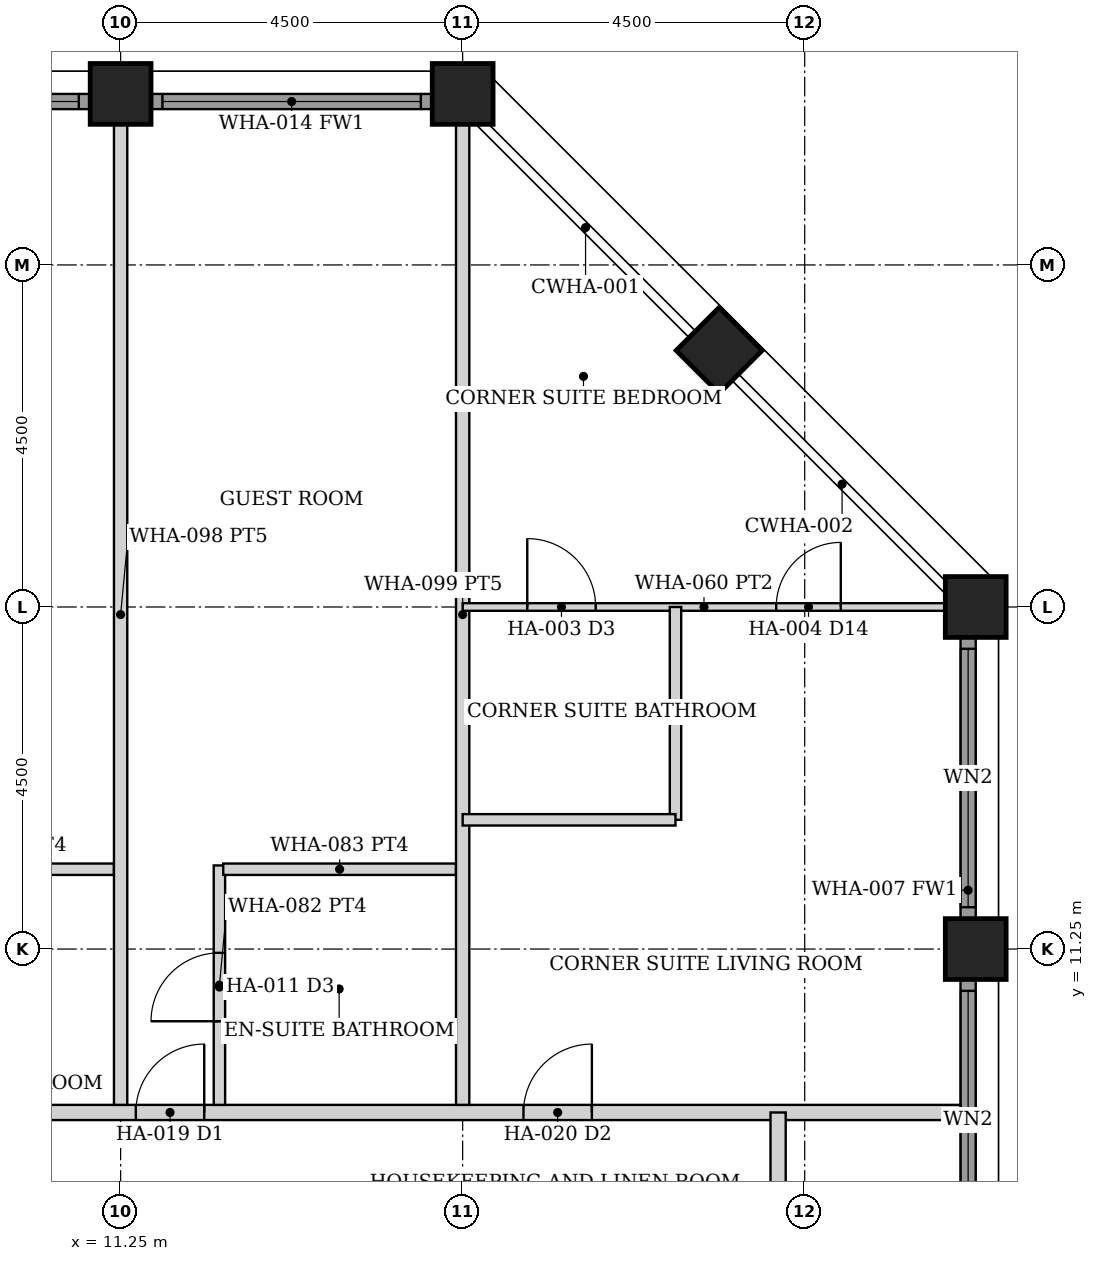
"""IFC4 building model, lengths in metres.
Left out: names, types, materials, properties, quantities, classifications, styles, units other than length and angle.
Written with IfcOpenShell. Run it as: python <this file> out.ifc"""

import sys

from ifc_helpers import new_model, si_unit, direction, frame, frame_2d, origin, origin_2d, place, context, subcontext, project, spatial, rectangle, hollow_rectangle, extrude, element, fill, save


model = new_model("IFC4")
c1 = context("Model", 3, precision=1e-05, world=origin(), true_north=direction((0.0, 1.0)))
c2 = subcontext(c1, "Body", "Model", "MODEL_VIEW")
j1 = project(units=[si_unit("LENGTHUNIT", "METRE"), si_unit("PLANEANGLEUNIT", "RADIAN")], contexts=[c1])
p1 = place(None, origin())
s1 = spatial("IfcSite", under=j1, at=p1, CompositionType="ELEMENT")
p2 = place(p1, origin())
s2 = spatial("IfcBuilding", under=s1, at=p2, CompositionType="ELEMENT")
p3 = place(p2, frame((0.0, 0.0, 118.4)))
s3 = spatial("IfcBuildingStorey", under=s2, at=p3, CompositionType="ELEMENT", Elevation=118.4)
for number, where, z_axis, x_axis in (
    (1, (11.25, 22.5, 0.0), (0.0, 0.0, 1.0), (0.0, 1.0, 0.0)),
    (2, (22.5, 11.25, 0.0), (0.0, 0.0, 1.0), (1.0, 0.0, 0.0)),
    (3, (15.75, 22.5, 0.0), (0.0, 0.0, 1.0), (0.0, 1.0, 0.0)),
    (4, (22.5, 15.75, 0.0), (0.0, 0.0, 1.0), (1.0, 0.0, 0.0)),
    (5, (19.125, 19.125, 0.0), (0.0, 0.0, 1.0), (0.707, 0.707, 0.0)),
):
    element("IfcColumn", number, at=place(p3, frame(where, z_axis=z_axis, x_axis=x_axis)), inside=s3, PredefinedType="COLUMN", context=c2, shape_type="SweptSolid", body=[
        extrude(hollow_rectangle(XDim=0.8, YDim=0.8, WallThickness=0.06, at=origin_2d()), origin(), (0.0, 0.0, 1.0), 3.6),
    ])
p4 = place(p3, frame((22.4, 7.155, 0.0), z_axis=(0.0, 0.0, 1.0), x_axis=(0.0, 1.0, 0.0)))
e6 = element("IfcWall", 6, at=p4, inside=s3, PredefinedType="SOLIDWALL", context=c2, shape_type="SweptSolid", body=[
    extrude(rectangle(XDim=3.69, YDim=0.2, at=frame_2d((1.845, 0.0))), origin(), (0.0, 0.0, 1.0), 2.479),
])
p5 = place(p4, frame((0.145, 0.0, 0.3)))
e7 = element("IfcOpeningElement", 7, at=p5, cuts=e6, PredefinedType="OPENING", context=c2, shape_type="SweptSolid", body=[
    extrude(rectangle(XDim=3.4, YDim=2.029, at=frame_2d((1.7, 1.015))), frame((0.0, 0.11, 0.0), z_axis=(0.0, -1.0, 0.0), x_axis=(1.0, 0.0, 0.0)), (0.0, 0.0, 1.0), 0.22),
])
p6 = place(p3, frame((22.4, 11.655, 0.0), z_axis=(0.0, 0.0, 1.0), x_axis=(0.0, 1.0, 0.0)))
e8 = element("IfcWall", 8, at=p6, inside=s3, PredefinedType="SOLIDWALL", context=c2, shape_type="SweptSolid", body=[
    extrude(rectangle(XDim=3.69, YDim=0.2, at=frame_2d((1.845, 0.0))), origin(), (0.0, 0.0, 1.0), 2.479),
])
p7 = place(p6, frame((0.145, 0.0, 0.3)))
e9 = element("IfcOpeningElement", 9, at=p7, cuts=e8, PredefinedType="OPENING", context=c2, shape_type="SweptSolid", body=[
    extrude(rectangle(XDim=3.4, YDim=2.029, at=frame_2d((1.7, 1.015))), frame((0.0, 0.11, 0.0), z_axis=(0.0, -1.0, 0.0), x_axis=(1.0, 0.0, 0.0)), (0.0, 0.0, 1.0), 0.22),
])
p8 = place(p3, frame((7.155, 22.4, 0.0), z_axis=(0.0, 0.0, 1.0), x_axis=(1.0, 0.0, 0.0)))
e10 = element("IfcWall", 10, at=p8, inside=s3, PredefinedType="SOLIDWALL", context=c2, shape_type="SweptSolid", body=[
    extrude(rectangle(XDim=3.69, YDim=0.2, at=frame_2d((1.845, 0.0))), origin(), (0.0, 0.0, 1.0), 2.479),
])
p9 = place(p8, frame((0.145, 0.0, 0.3)))
e11 = element("IfcOpeningElement", 11, at=p9, cuts=e10, PredefinedType="OPENING", context=c2, shape_type="SweptSolid", body=[
    extrude(rectangle(XDim=3.4, YDim=2.029, at=frame_2d((1.7, 1.015))), frame((0.0, 0.11, 0.0), z_axis=(0.0, -1.0, 0.0), x_axis=(1.0, 0.0, 0.0)), (0.0, 0.0, 1.0), 0.22),
])
p10 = place(p3, frame((11.655, 22.4, 0.0), z_axis=(0.0, 0.0, 1.0), x_axis=(1.0, 0.0, 0.0)))
e12 = element("IfcWall", 12, at=p10, inside=s3, PredefinedType="SOLIDWALL", context=c2, shape_type="SweptSolid", body=[
    extrude(rectangle(XDim=3.69, YDim=0.2, at=frame_2d((1.845, 0.0))), origin(), (0.0, 0.0, 1.0), 2.479),
])
p11 = place(p10, frame((0.145, 0.0, 0.3)))
e13 = element("IfcOpeningElement", 13, at=p11, cuts=e12, PredefinedType="OPENING", context=c2, shape_type="SweptSolid", body=[
    extrude(rectangle(XDim=3.4, YDim=2.029, at=frame_2d((1.7, 1.015))), frame((0.0, 0.11, 0.0), z_axis=(0.0, -1.0, 0.0), x_axis=(1.0, 0.0, 0.0)), (0.0, 0.0, 1.0), 0.22),
])
p12 = place(p3, frame((-22.3, 9.1, 0.0), z_axis=(0.0, 0.0, 1.0), x_axis=(1.0, 0.0, 0.0)))
e14 = element("IfcWall", 14, at=p12, inside=s3, PredefinedType="PARTITIONING", context=c2, shape_type="SweptSolid", body=[
    extrude(rectangle(XDim=44.6, YDim=0.2, at=frame_2d((22.3, 0.0))), origin(), (0.0, 0.0, 1.0), 2.473),
])
p13 = place(p12, frame((6.75, 0.0, 0.0)))
e15 = element("IfcOpeningElement", 15, at=p13, cuts=e14, PredefinedType="OPENING", context=c2, shape_type="SweptSolid", body=[
    extrude(rectangle(XDim=0.9, YDim=2.1, at=frame_2d((0.45, 1.05))), frame((0.0, 0.11, 0.0), z_axis=(0.0, -1.0, 0.0), x_axis=(1.0, 0.0, 0.0)), (0.0, 0.0, 1.0), 0.22),
])
p14 = place(p12, frame((11.25, 0.0, 0.0)))
e16 = element("IfcOpeningElement", 16, at=p14, cuts=e14, PredefinedType="OPENING", context=c2, shape_type="SweptSolid", body=[
    extrude(rectangle(XDim=0.9, YDim=2.1, at=frame_2d((0.45, 1.05))), frame((0.0, 0.11, 0.0), z_axis=(0.0, -1.0, 0.0), x_axis=(1.0, 0.0, 0.0)), (0.0, 0.0, 1.0), 0.22),
])
p15 = place(p12, frame((15.75, 0.0, 0.0)))
e17 = element("IfcOpeningElement", 17, at=p15, cuts=e14, PredefinedType="OPENING", context=c2, shape_type="SweptSolid", body=[
    extrude(rectangle(XDim=0.9, YDim=2.1, at=frame_2d((0.45, 1.05))), frame((0.0, 0.11, 0.0), z_axis=(0.0, -1.0, 0.0), x_axis=(1.0, 0.0, 0.0)), (0.0, 0.0, 1.0), 0.22),
])
p16 = place(p12, frame((20.25, 0.0, 0.0)))
e18 = element("IfcOpeningElement", 18, at=p16, cuts=e14, PredefinedType="OPENING", context=c2, shape_type="SweptSolid", body=[
    extrude(rectangle(XDim=0.9, YDim=2.1, at=frame_2d((0.45, 1.05))), frame((0.0, 0.11, 0.0), z_axis=(0.0, -1.0, 0.0), x_axis=(1.0, 0.0, 0.0)), (0.0, 0.0, 1.0), 0.22),
])
p17 = place(p12, frame((24.75, 0.0, 0.0)))
e19 = element("IfcOpeningElement", 19, at=p17, cuts=e14, PredefinedType="OPENING", context=c2, shape_type="SweptSolid", body=[
    extrude(rectangle(XDim=0.9, YDim=2.1, at=frame_2d((0.45, 1.05))), frame((0.0, 0.11, 0.0), z_axis=(0.0, -1.0, 0.0), x_axis=(1.0, 0.0, 0.0)), (0.0, 0.0, 1.0), 0.22),
])
p18 = place(p12, frame((29.25, 0.0, 0.0)))
e20 = element("IfcOpeningElement", 20, at=p18, cuts=e14, PredefinedType="OPENING", context=c2, shape_type="SweptSolid", body=[
    extrude(rectangle(XDim=0.9, YDim=2.1, at=frame_2d((0.45, 1.05))), frame((0.0, 0.11, 0.0), z_axis=(0.0, -1.0, 0.0), x_axis=(1.0, 0.0, 0.0)), (0.0, 0.0, 1.0), 0.22),
])
p19 = place(p12, frame((33.75, 0.0, 0.0)))
e21 = element("IfcOpeningElement", 21, at=p19, cuts=e14, PredefinedType="OPENING", context=c2, shape_type="SweptSolid", body=[
    extrude(rectangle(XDim=0.9, YDim=2.1, at=frame_2d((0.45, 1.05))), frame((0.0, 0.11, 0.0), z_axis=(0.0, -1.0, 0.0), x_axis=(1.0, 0.0, 0.0)), (0.0, 0.0, 1.0), 0.22),
])
p20 = place(p12, frame((38.85, 0.0, 0.0)))
e22 = element("IfcOpeningElement", 22, at=p20, cuts=e14, PredefinedType="OPENING", context=c2, shape_type="SweptSolid", body=[
    extrude(rectangle(XDim=0.9, YDim=2.1, at=frame_2d((0.45, 1.05))), frame((0.0, 0.11, 0.0), z_axis=(0.0, -1.0, 0.0), x_axis=(1.0, 0.0, 0.0)), (0.0, 0.0, 1.0), 0.22),
])
p21 = place(p12, frame((4.85, 0.0, 0.0)))
e23 = element("IfcOpeningElement", 23, at=p21, cuts=e14, PredefinedType="OPENING", context=c2, shape_type="SweptSolid", body=[
    extrude(rectangle(XDim=0.9, YDim=2.1, at=frame_2d((0.45, 1.05))), frame((0.0, 0.11, 0.0), z_axis=(0.0, -1.0, 0.0), x_axis=(1.0, 0.0, 0.0)), (0.0, 0.0, 1.0), 0.22),
])
p22 = place(p3, frame((19.9, 2.2, 0.0), z_axis=(0.0, 0.0, 1.0), x_axis=(0.0, 1.0, 0.0)))
e24 = element("IfcWall", 24, at=p22, inside=s3, PredefinedType="PARTITIONING", context=c2, shape_type="SweptSolid", body=[
    extrude(rectangle(XDim=6.9, YDim=0.2, at=frame_2d((3.45, 0.0))), origin(), (0.0, 0.0, 1.0), 2.473),
])
p23 = place(p22, frame((2.75, 0.0, 0.0)))
e25 = element("IfcOpeningElement", 25, at=p23, cuts=e24, PredefinedType="OPENING", context=c2, shape_type="SweptSolid", body=[
    extrude(rectangle(XDim=1.35, YDim=2.1, at=frame_2d((0.675, 1.05))), frame((0.0, 0.11, 0.0), z_axis=(0.0, -1.0, 0.0), x_axis=(1.0, 0.0, 0.0)), (0.0, 0.0, 1.0), 0.22),
])
p24 = place(p3, frame((8.1, 12.3, 0.0), z_axis=(0.0, 0.0, 1.0), x_axis=(1.0, 0.0, 0.0)))
e26 = element("IfcWall", 26, at=p24, inside=s3, PredefinedType="PARTITIONING", context=c2, shape_type="SweptSolid", body=[
    extrude(rectangle(XDim=3.062, YDim=0.15, at=frame_2d((1.531, 0.0))), origin(), (0.0, 0.0, 1.0), 2.473),
])
p25 = place(p3, frame((12.55, 9.2, 0.0), z_axis=(0.0, 0.0, 1.0), x_axis=(0.0, 1.0, 0.0)))
e27 = element("IfcWall", 27, at=p25, inside=s3, PredefinedType="PARTITIONING", context=c2, shape_type="SweptSolid", body=[
    extrude(rectangle(XDim=3.15, YDim=0.15, at=frame_2d((1.575, 0.0))), origin(), (0.0, 0.0, 1.0), 2.473),
])
p26 = place(p25, frame((1.1, 0.0, 0.0)))
e28 = element("IfcOpeningElement", 28, at=p26, cuts=e27, PredefinedType="OPENING", context=c2, shape_type="SweptSolid", body=[
    extrude(rectangle(XDim=0.9, YDim=2.1, at=frame_2d((0.45, 1.05))), frame((0.0, 0.085, 0.0), z_axis=(0.0, -1.0, 0.0), x_axis=(1.0, 0.0, 0.0)), (0.0, 0.0, 1.0), 0.17),
])
p27 = place(p3, frame((12.6, 12.3, 0.0), z_axis=(0.0, 0.0, 1.0), x_axis=(1.0, 0.0, 0.0)))
e29 = element("IfcWall", 29, at=p27, inside=s3, PredefinedType="PARTITIONING", context=c2, shape_type="SweptSolid", body=[
    extrude(rectangle(XDim=3.062, YDim=0.15, at=frame_2d((1.531, 0.0))), origin(), (0.0, 0.0, 1.0), 2.473),
])
for number, where, z_axis, x_axis in (
    (30, (11.25, 9.2, 0.0), (0.0, 0.0, 1.0), (0.0, 1.0, 0.0)),
    (31, (15.75, 9.2, 0.0), (0.0, 0.0, 1.0), (0.0, 1.0, 0.0)),
):
    element("IfcWall", number, at=place(p3, frame(where, z_axis=z_axis, x_axis=x_axis)), inside=s3, PredefinedType="PARTITIONING", context=c2, shape_type="SweptSolid", body=[
        extrude(rectangle(XDim=12.9, YDim=0.175, at=frame_2d((6.45, 0.0))), origin(), (0.0, 0.0, 1.0), 2.473),
    ])
p28 = place(p3, frame((15.75, 15.75, 0.0), z_axis=(0.0, 0.0, 1.0), x_axis=(1.0, 0.0, 0.0)))
e32 = element("IfcWall", 32, at=p28, inside=s3, PredefinedType="PARTITIONING", context=c2, shape_type="SweptSolid", body=[
    extrude(rectangle(XDim=6.35, YDim=0.1, at=frame_2d((3.175, 0.0))), origin(), (0.0, 0.0, 1.0), 2.473),
])
p29 = place(p28, frame((4.125, 0.0, 0.0)))
e33 = element("IfcOpeningElement", 33, at=p29, cuts=e32, PredefinedType="OPENING", context=c2, shape_type="SweptSolid", body=[
    extrude(rectangle(XDim=0.85, YDim=2.1, at=frame_2d((0.425, 1.05))), frame((0.0, 0.06, 0.0), z_axis=(0.0, -1.0, 0.0), x_axis=(1.0, 0.0, 0.0)), (0.0, 0.0, 1.0), 0.12),
])
p30 = place(p28, frame((0.85, 0.0, 0.0)))
e34 = element("IfcOpeningElement", 34, at=p30, cuts=e32, PredefinedType="OPENING", context=c2, shape_type="SweptSolid", body=[
    extrude(rectangle(XDim=0.9, YDim=2.1, at=frame_2d((0.45, 1.05))), frame((0.0, 0.06, 0.0), z_axis=(0.0, -1.0, 0.0), x_axis=(1.0, 0.0, 0.0)), (0.0, 0.0, 1.0), 0.12),
])
for number, where, z_axis, x_axis in (
    (35, (18.55, 12.95, 0.0), (0.0, 0.0, 1.0), (0.0, 1.0, 0.0)),
    (36, (15.75, 12.95, 0.0), (0.0, 0.0, 1.0), (1.0, 0.0, 0.0)),
):
    element("IfcWall", number, at=place(p3, frame(where, z_axis=z_axis, x_axis=x_axis)), inside=s3, PredefinedType="PARTITIONING", context=c2, shape_type="SweptSolid", body=[
        extrude(rectangle(XDim=2.8, YDim=0.15, at=frame_2d((1.4, 0.0))), origin(), (0.0, 0.0, 1.0), 2.473),
    ])
p31 = place(p5, origin())
e37 = element("IfcWindow", 37, at=p31, inside=s3, PartitioningType="SINGLE_PANEL", PredefinedType="WINDOW", context=c2, shape_type="SweptSolid", body=[
    extrude(rectangle(XDim=3.4, YDim=2.029, at=frame_2d((1.7, 1.015))), frame((0.0, 0.03, 0.0), z_axis=(0.0, -1.0, 0.0), x_axis=(1.0, 0.0, 0.0)), (0.0, 0.0, 1.0), 0.06),
])
fill(e7, e37)
p32 = place(p7, origin())
e38 = element("IfcWindow", 38, at=p32, inside=s3, PartitioningType="SINGLE_PANEL", PredefinedType="WINDOW", context=c2, shape_type="SweptSolid", body=[
    extrude(rectangle(XDim=3.4, YDim=2.029, at=frame_2d((1.7, 1.015))), frame((0.0, 0.03, 0.0), z_axis=(0.0, -1.0, 0.0), x_axis=(1.0, 0.0, 0.0)), (0.0, 0.0, 1.0), 0.06),
])
fill(e9, e38)
p33 = place(p9, origin())
e39 = element("IfcWindow", 39, at=p33, inside=s3, PartitioningType="SINGLE_PANEL", PredefinedType="WINDOW", context=c2, shape_type="SweptSolid", body=[
    extrude(rectangle(XDim=3.4, YDim=2.029, at=frame_2d((1.7, 1.015))), frame((0.0, 0.03, 0.0), z_axis=(0.0, -1.0, 0.0), x_axis=(1.0, 0.0, 0.0)), (0.0, 0.0, 1.0), 0.06),
])
fill(e11, e39)
p34 = place(p11, origin())
e40 = element("IfcWindow", 40, at=p34, inside=s3, PartitioningType="SINGLE_PANEL", PredefinedType="WINDOW", context=c2, shape_type="SweptSolid", body=[
    extrude(rectangle(XDim=3.4, YDim=2.029, at=frame_2d((1.7, 1.015))), frame((0.0, 0.03, 0.0), z_axis=(0.0, -1.0, 0.0), x_axis=(1.0, 0.0, 0.0)), (0.0, 0.0, 1.0), 0.06),
])
fill(e13, e40)
p35 = place(p19, origin())
e41 = element("IfcDoor", 41, at=p35, inside=s3, OperationType="SINGLE_SWING_RIGHT", PredefinedType="DOOR", context=c2, shape_type="SweptSolid", body=[
    extrude(rectangle(XDim=0.9, YDim=2.1, at=frame_2d((0.45, 1.05))), frame((0.0, 0.025, 0.0), z_axis=(0.0, -1.0, 0.0), x_axis=(1.0, 0.0, 0.0)), (0.0, 0.0, 1.0), 0.05),
])
fill(e21, e41)
p36 = place(p26, origin())
e42 = element("IfcDoor", 42, at=p36, inside=s3, OperationType="SINGLE_SWING_LEFT", PredefinedType="DOOR", context=c2, shape_type="SweptSolid", body=[
    extrude(rectangle(XDim=0.9, YDim=2.1, at=frame_2d((0.45, 1.05))), frame((0.0, 0.025, 0.0), z_axis=(0.0, -1.0, 0.0), x_axis=(1.0, 0.0, 0.0)), (0.0, 0.0, 1.0), 0.05),
])
fill(e28, e42)
p37 = place(p20, origin())
e43 = element("IfcDoor", 43, at=p37, inside=s3, OperationType="SINGLE_SWING_RIGHT", PredefinedType="DOOR", context=c2, shape_type="SweptSolid", body=[
    extrude(rectangle(XDim=0.9, YDim=2.1, at=frame_2d((0.45, 1.05))), frame((0.0, 0.025, 0.0), z_axis=(0.0, -1.0, 0.0), x_axis=(1.0, 0.0, 0.0)), (0.0, 0.0, 1.0), 0.05),
])
fill(e22, e43)
p38 = place(p29, origin())
e44 = element("IfcDoor", 44, at=p38, inside=s3, OperationType="SINGLE_SWING_RIGHT", PredefinedType="DOOR", context=c2, shape_type="SweptSolid", body=[
    extrude(rectangle(XDim=0.85, YDim=2.1, at=frame_2d((0.425, 1.05))), frame((0.0, 0.025, 0.0), z_axis=(0.0, -1.0, 0.0), x_axis=(1.0, 0.0, 0.0)), (0.0, 0.0, 1.0), 0.05),
])
fill(e33, e44)
p39 = place(p30, origin())
e45 = element("IfcDoor", 45, at=p39, inside=s3, OperationType="SINGLE_SWING_LEFT", PredefinedType="DOOR", context=c2, shape_type="SweptSolid", body=[
    extrude(rectangle(XDim=0.9, YDim=2.1, at=frame_2d((0.45, 1.05))), frame((0.0, 0.025, 0.0), z_axis=(0.0, -1.0, 0.0), x_axis=(1.0, 0.0, 0.0)), (0.0, 0.0, 1.0), 0.05),
])
fill(e34, e45)
save(model, sys.argv[1])
